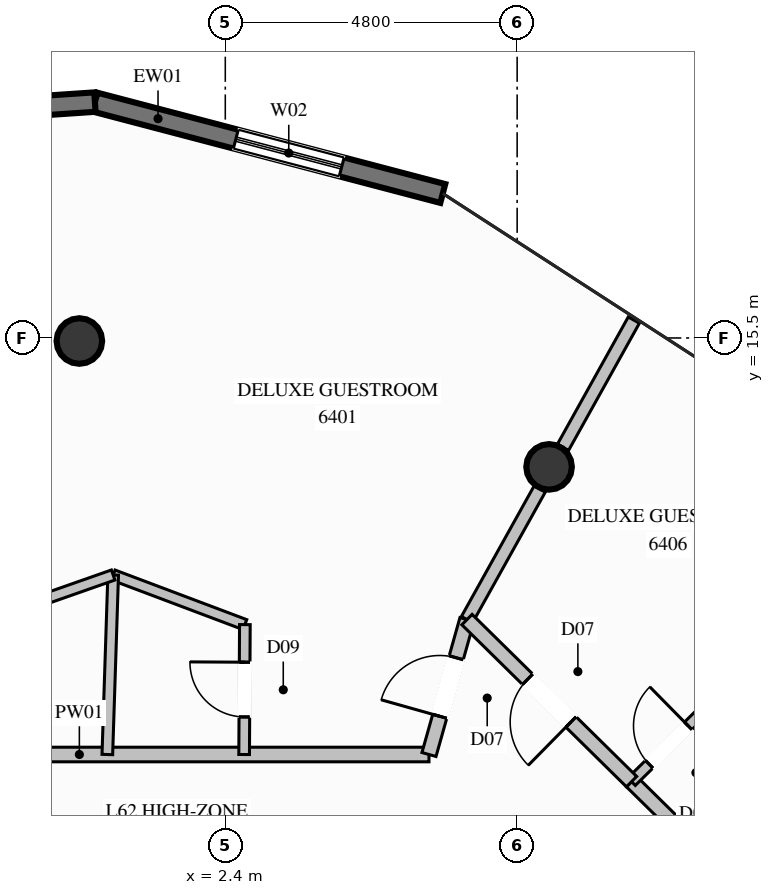
"""IFC4 building model, lengths in metres.
Left out: names, types, materials, properties, quantities, classifications, styles, units other than length and angle.
Written with IfcOpenShell. Run it as: python <this file> out.ifc"""

import sys

from ifc_helpers import new_model, si_unit, direction, frame, frame_2d, origin, origin_2d, place, context, subcontext, project, spatial, rectangle, circle, extrude, element, fill, save


model = new_model("IFC4")
c1 = context("Model", 3, precision=1e-05, world=origin(), true_north=direction((0.0, 1.0)))
c2 = subcontext(c1, "Body", "Model", "MODEL_VIEW")
j1 = project(units=[si_unit("LENGTHUNIT", "METRE"), si_unit("PLANEANGLEUNIT", "RADIAN")], contexts=[c1])
p1 = place(None, origin())
s1 = spatial("IfcSite", under=j1, at=p1, CompositionType="ELEMENT")
p2 = place(p1, origin())
s2 = spatial("IfcBuilding", under=s1, at=p2, CompositionType="ELEMENT")
p3 = place(p2, frame((0.0, 0.0, 239.2)))
s3 = spatial("IfcBuildingStorey", under=s2, at=p3, CompositionType="ELEMENT", Elevation=239.2)
for number, where, z_axis, x_axis in (
    (1, (7.725, 13.38, 0.0), (0.0, 0.0, 1.0), (1.0, 0.0, 0.0)),
    (2, (0.0, 15.45, 0.0), (0.0, 0.0, 1.0), (1.0, 0.0, 0.0)),
):
    element("IfcColumn", number, at=place(p3, frame(where, z_axis=z_axis, x_axis=x_axis)), inside=s3, PredefinedType="COLUMN", context=c2, shape_type="SweptSolid", body=[
        extrude(circle(Radius=0.375, at=origin_2d()), origin(), (0.0, 0.0, 1.0), 3.8),
    ])
p4 = place(p3, frame((0.256, 19.379, 0.0), z_axis=(0.0, 0.0, 1.0), x_axis=(0.967181914063, -0.254084917124, 0.0)))
e3 = element("IfcWall", 3, at=p4, inside=s3, PredefinedType="SOLIDWALL", context=c2, shape_type="SweptSolid", body=[
    extrude(rectangle(XDim=5.915, YDim=0.32, at=frame_2d((2.958, 0.0))), origin(), (0.0, 0.0, 1.0), 3.57),
])
p5 = place(p4, frame((2.396, 0.0, 0.35)))
e4 = element("IfcOpeningElement", 4, at=p5, cuts=e3, PredefinedType="OPENING", context=c2, shape_type="SweptSolid", body=[
    extrude(rectangle(XDim=1.8, YDim=2.6, at=frame_2d((0.9, 1.3))), frame((0.0, 0.17, 0.0), z_axis=(0.0, -1.0, 0.0), x_axis=(1.0, 0.0, 0.0)), (0.0, 0.0, 1.0), 0.34),
])
p6 = place(p3, frame((-5.603, 18.985, 0.0), z_axis=(0.0, 0.0, 1.0), x_axis=(0.997748955427, 0.067059838539, 0.0)))
e5 = element("IfcWall", 5, at=p6, inside=s3, PredefinedType="SOLIDWALL", context=c2, shape_type="SweptSolid", body=[
    extrude(rectangle(XDim=5.872, YDim=0.32, at=frame_2d((2.936, 0.0))), origin(), (0.0, 0.0, 1.0), 3.57),
])
p7 = place(p6, frame((2.036, 0.0, 0.35)))
e6 = element("IfcOpeningElement", 6, at=p7, cuts=e5, PredefinedType="OPENING", context=c2, shape_type="SweptSolid", body=[
    extrude(rectangle(XDim=1.8, YDim=2.6, at=frame_2d((0.9, 1.3))), frame((0.0, 0.17, 0.0), z_axis=(0.0, -1.0, 0.0), x_axis=(1.0, 0.0, 0.0)), (0.0, 0.0, 1.0), 0.34),
])
p8 = place(p3, frame((-5.75, 8.65, 0.0), z_axis=(0.0, 0.0, 1.0), x_axis=(1.0, 0.0, 0.0)))
e7 = element("IfcWall", 7, at=p8, inside=s3, PredefinedType="PARTITIONING", context=c2, shape_type="SweptSolid", body=[
    extrude(rectangle(XDim=11.5, YDim=0.24, at=frame_2d((5.75, 0.0))), origin(), (0.0, 0.0, 1.0), 3.57),
])
p9 = place(p3, frame((6.375, 10.869, 0.0), z_axis=(0.0, 0.0, 1.0), x_axis=(0.486620940413, 0.873613221255, 0.0)))
e8 = element("IfcWall", 8, at=p9, inside=s3, PredefinedType="PARTITIONING", context=c2, shape_type="SweptSolid", body=[
    extrude(rectangle(XDim=2.458, YDim=0.21, at=frame_2d((1.229, 0.0))), origin(), (0.0, 0.0, 1.0), 3.011),
])
p10 = place(p3, frame((7.954, 13.702, 0.0), z_axis=(0.0, 0.0, 1.0), x_axis=(0.486456485885, 0.873704805607, 0.0)))
e9 = element("IfcWall", 9, at=p10, inside=s3, PredefinedType="PARTITIONING", context=c2, shape_type="SweptSolid", body=[
    extrude(rectangle(XDim=2.395, YDim=0.21, at=frame_2d((1.197, 0.0))), origin(), (0.0, 0.0, 1.0), 3.57),
])
p11 = place(p3, frame((0.556, 11.602, 0.0), z_axis=(0.0, 0.0, 1.0), x_axis=(0.935773181831, -0.35260254135, 0.0)))
e10 = element("IfcWall", 10, at=p11, inside=s3, PredefinedType="PLUMBINGWALL", context=c2, shape_type="SweptSolid", body=[
    extrude(rectangle(XDim=2.315, YDim=0.175, at=frame_2d((1.157, 0.0))), origin(), (0.0, 0.0, 1.0), 3.253),
])
p12 = place(p3, frame((0.556, 11.602, 0.0), z_axis=(0.0, 0.0, 1.0), x_axis=(-0.032483675207, -0.999472266171, 0.0)))
e11 = element("IfcWall", 11, at=p12, inside=s3, PredefinedType="PLUMBINGWALL", context=c2, shape_type="SweptSolid", body=[
    extrude(rectangle(XDim=2.954, YDim=0.175, at=frame_2d((1.477, 0.0))), origin(), (0.0, 0.0, 1.0), 3.57),
])
p13 = place(p3, frame((2.71, 8.65, 0.0), z_axis=(0.0, 0.0, 1.0), x_axis=(0.005600552237, 0.999984316784, 0.0)))
e12 = element("IfcWall", 12, at=p13, inside=s3, PredefinedType="PLUMBINGWALL", context=c2, shape_type="SweptSolid", body=[
    extrude(rectangle(XDim=2.136, YDim=0.175, at=frame_2d((1.068, 0.0))), origin(), (0.0, 0.0, 1.0), 3.57),
])
p14 = place(p13, frame((0.618, 0.0, 0.0)))
e13 = element("IfcOpeningElement", 13, at=p14, cuts=e12, PredefinedType="OPENING", context=c2, shape_type="SweptSolid", body=[
    extrude(rectangle(XDim=0.9, YDim=2.1, at=frame_2d((0.45, 1.05))), frame((0.0, 0.098, 0.0), z_axis=(0.0, -1.0, 0.0), x_axis=(1.0, 0.0, 0.0)), (0.0, 0.0, 1.0), 0.195),
])
p15 = place(p3, frame((5.75, 8.65, 0.0), z_axis=(0.0, 0.0, 1.0), x_axis=(0.271110513922, 0.962548226969, 0.0)))
e14 = element("IfcWall", 14, at=p15, inside=s3, PredefinedType="PARTITIONING", context=c2, shape_type="SweptSolid", body=[
    extrude(rectangle(XDim=2.305, YDim=0.24, at=frame_2d((1.153, 0.0))), origin(), (0.0, 0.0, 1.0), 3.57),
])
p16 = place(p15, frame((0.653, 0.0, 0.0)))
e15 = element("IfcOpeningElement", 15, at=p16, cuts=e14, PredefinedType="OPENING", context=c2, shape_type="SweptSolid", body=[
    extrude(rectangle(XDim=1.0, YDim=2.2, at=frame_2d((0.5, 1.1))), frame((0.0, 0.13, 0.0), z_axis=(0.0, -1.0, 0.0), x_axis=(1.0, 0.0, 0.0)), (0.0, 0.0, 1.0), 0.26),
])
p17 = place(p3, frame((-1.767, 10.786, 0.0), z_axis=(0.0, 0.0, 1.0), x_axis=(0.943463492061, 0.331476453385, 0.0)))
e16 = element("IfcWall", 16, at=p17, inside=s3, PredefinedType="PLUMBINGWALL", context=c2, shape_type="SweptSolid", body=[
    extrude(rectangle(XDim=2.462, YDim=0.175, at=frame_2d((1.231, 0.0))), origin(), (0.0, 0.0, 1.0), 3.253),
])
p18 = place(p3, frame((11.042, 6.275, 0.0), z_axis=(0.0, 0.0, 1.0), x_axis=(-0.712677423321, 0.701491903224, 0.0)))
e17 = element("IfcWall", 17, at=p18, inside=s3, PredefinedType="PARTITIONING", context=c2, shape_type="SweptSolid", body=[
    extrude(rectangle(XDim=2.75, YDim=0.24, at=frame_2d((1.375, 0.0))), origin(), (0.0, 0.0, 1.0), 3.57),
])
p19 = place(p3, frame((9.082, 8.204, 0.0), z_axis=(0.0, 0.0, 1.0), x_axis=(0.712642440828, 0.701527441751, 0.0)))
e18 = element("IfcWall", 18, at=p19, inside=s3, PredefinedType="PLUMBINGWALL", context=c2, shape_type="SweptSolid", body=[
    extrude(rectangle(XDim=1.713, YDim=0.175, at=frame_2d((0.857, 0.0))), origin(), (0.0, 0.0, 1.0), 3.57),
])
p20 = place(p19, frame((0.407, 0.0, 0.0)))
e19 = element("IfcOpeningElement", 19, at=p20, cuts=e18, PredefinedType="OPENING", context=c2, shape_type="SweptSolid", body=[
    extrude(rectangle(XDim=0.9, YDim=2.1, at=frame_2d((0.45, 1.05))), frame((0.0, 0.098, 0.0), z_axis=(0.0, -1.0, 0.0), x_axis=(1.0, 0.0, 0.0)), (0.0, 0.0, 1.0), 0.195),
])
p21 = place(p3, frame((9.082, 8.204, 0.0), z_axis=(0.0, 0.0, 1.0), x_axis=(-0.712644426178, 0.70152542494, 0.0)))
e20 = element("IfcWall", 20, at=p21, inside=s3, PredefinedType="PARTITIONING", context=c2, shape_type="SweptSolid", body=[
    extrude(rectangle(XDim=3.799, YDim=0.24, at=frame_2d((1.899, 0.0))), origin(), (0.0, 0.0, 1.0), 3.57),
])
p22 = place(p21, frame((1.399, 0.0, 0.0)))
e21 = element("IfcOpeningElement", 21, at=p22, cuts=e20, PredefinedType="OPENING", context=c2, shape_type="SweptSolid", body=[
    extrude(rectangle(XDim=1.0, YDim=2.2, at=frame_2d((0.5, 1.1))), frame((0.0, 0.13, 0.0), z_axis=(0.0, -1.0, 0.0), x_axis=(1.0, 0.0, 0.0)), (0.0, 0.0, 1.0), 0.26),
])
p23 = place(p5, origin())
e22 = element("IfcWindow", 22, at=p23, inside=s3, PartitioningType="SINGLE_PANEL", PredefinedType="WINDOW", context=c2, shape_type="SweptSolid", body=[
    extrude(rectangle(XDim=1.8, YDim=2.6, at=frame_2d((0.9, 1.3))), frame((0.0, 0.03, 0.0), z_axis=(0.0, -1.0, 0.0), x_axis=(1.0, 0.0, 0.0)), (0.0, 0.0, 1.0), 0.06),
])
fill(e4, e22)
p24 = place(p14, origin())
e23 = element("IfcDoor", 23, at=p24, inside=s3, OperationType="SINGLE_SWING_RIGHT", PredefinedType="DOOR", context=c2, shape_type="SweptSolid", body=[
    extrude(rectangle(XDim=0.9, YDim=2.1, at=frame_2d((0.45, 1.05))), frame((0.0, 0.025, 0.0), z_axis=(0.0, -1.0, 0.0), x_axis=(1.0, 0.0, 0.0)), (0.0, 0.0, 1.0), 0.05),
])
fill(e13, e23)
p25 = place(p16, origin())
e24 = element("IfcDoor", 24, at=p25, inside=s3, OperationType="SINGLE_SWING_LEFT", PredefinedType="DOOR", context=c2, shape_type="SweptSolid", body=[
    extrude(rectangle(XDim=1.0, YDim=2.2, at=frame_2d((0.5, 1.1))), frame((0.0, 0.025, 0.0), z_axis=(0.0, -1.0, 0.0), x_axis=(1.0, 0.0, 0.0)), (0.0, 0.0, 1.0), 0.05),
])
fill(e15, e24)
p26 = place(p20, origin())
e25 = element("IfcDoor", 25, at=p26, inside=s3, OperationType="SINGLE_SWING_RIGHT", PredefinedType="DOOR", context=c2, shape_type="SweptSolid", body=[
    extrude(rectangle(XDim=0.9, YDim=2.1, at=frame_2d((0.45, 1.05))), frame((0.0, 0.025, 0.0), z_axis=(0.0, -1.0, 0.0), x_axis=(1.0, 0.0, 0.0)), (0.0, 0.0, 1.0), 0.05),
])
fill(e19, e25)
p27 = place(p22, origin())
e26 = element("IfcDoor", 26, at=p27, inside=s3, OperationType="SINGLE_SWING_LEFT", PredefinedType="DOOR", context=c2, shape_type="SweptSolid", body=[
    extrude(rectangle(XDim=1.0, YDim=2.2, at=frame_2d((0.5, 1.1))), frame((0.0, 0.025, 0.0), z_axis=(0.0, -1.0, 0.0), x_axis=(1.0, 0.0, 0.0)), (0.0, 0.0, 1.0), 0.05),
])
fill(e21, e26)
save(model, sys.argv[1])
